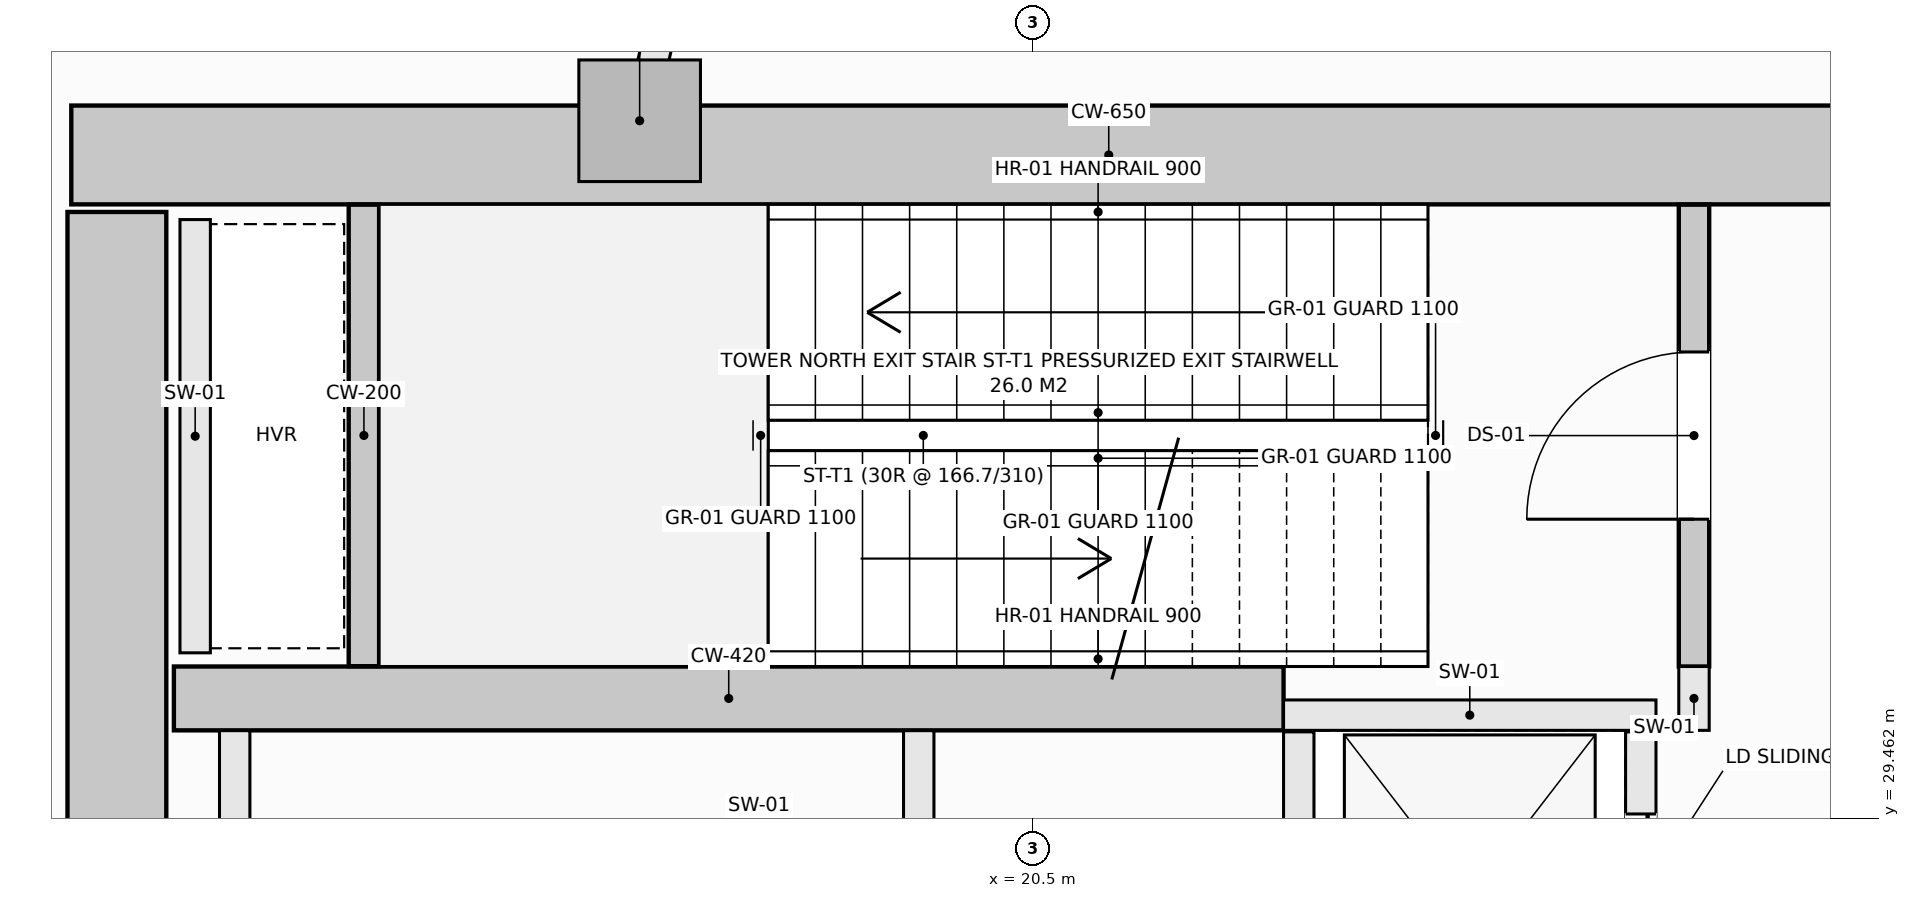
"""IFC4 building model, lengths in metres.
Left out: names, types, materials, properties, quantities, classifications, styles, units other than length and angle.
Written with IfcOpenShell. Run it as: python <this file> out.ifc"""

import sys

from ifc_helpers import new_model, si_unit, direction, frame, frame_2d, origin, origin_2d, place, context, subcontext, project, spatial, rectangle, extrude, element, fill, save


model = new_model("IFC4")
c1 = context("Model", 3, precision=1e-05, world=origin(), true_north=direction((0.0, 1.0)))
c2 = subcontext(c1, "Body", "Model", "MODEL_VIEW")
j1 = project(units=[si_unit("LENGTHUNIT", "METRE"), si_unit("PLANEANGLEUNIT", "RADIAN")], contexts=[c1])
p1 = place(None, origin())
s1 = spatial("IfcSite", under=j1, at=p1, CompositionType="ELEMENT")
p2 = place(p1, origin())
s2 = spatial("IfcBuilding", under=s1, at=p2, CompositionType="ELEMENT")
p3 = place(p2, frame((0.0, 0.0, 186.9)))
s3 = spatial("IfcBuildingStorey", under=s2, at=p3, CompositionType="ELEMENT", Elevation=186.9)
p4 = place(p3, frame((14.175, 33.825, -0.32), z_axis=(0.0, 0.0, 1.0), x_axis=(1.0, 0.0, 0.0)))
e1 = element("IfcWall", 1, at=p4, inside=s3, PredefinedType="SHEAR", context=c2, shape_type="SweptSolid", body=[
    extrude(rectangle(XDim=13.65, YDim=0.65, at=frame_2d((6.825, 0.0))), origin(), (0.0, 0.0, 1.0), 5.04),
])
p5 = place(p3, frame((14.475, 20.55, -0.32), z_axis=(0.0, 0.0, 1.0), x_axis=(0.0, 1.0, 0.0)))
e2 = element("IfcWall", 2, at=p5, inside=s3, PredefinedType="SHEAR", context=c2, shape_type="SweptSolid", body=[
    extrude(rectangle(XDim=12.9, YDim=0.65, at=frame_2d((6.45, 0.0))), origin(), (0.0, 0.0, 1.0), 5.04),
])
p6 = place(p3, frame((14.85, 30.25, -0.32), z_axis=(0.0, 0.0, 1.0), x_axis=(1.0, 0.0, 0.0)))
e3 = element("IfcWall", 3, at=p6, inside=s3, PredefinedType="SHEAR", context=c2, shape_type="SweptSolid", body=[
    extrude(rectangle(XDim=7.3, YDim=0.42, at=frame_2d((3.65, 0.0))), origin(), (0.0, 0.0, 1.0), 5.04),
])
p7 = place(p3, frame((17.914, 34.05, -0.32), z_axis=(0.0, 0.0, 1.0), x_axis=(1.0, 0.0, 0.0)))
e4 = element("IfcColumn", 4, at=p7, inside=s3, PredefinedType="PILASTER", context=c2, shape_type="SweptSolid", body=[
    extrude(rectangle(XDim=0.8, YDim=0.8, at=origin_2d()), origin(), (0.0, 0.0, 1.0), 5.04),
])
p8 = place(p3, frame((24.85, 30.46, -0.32), z_axis=(0.0, 0.0, 1.0), x_axis=(0.0, 1.0, 0.0)))
e5 = element("IfcWall", 5, at=p8, inside=s3, PredefinedType="SHEAR", context=c2, shape_type="SweptSolid", body=[
    extrude(rectangle(XDim=3.038, YDim=0.2, at=frame_2d((1.519, 0.0))), origin(), (0.0, 0.0, 1.0), 5.04),
])
p9 = place(p8, frame((0.969, 0.0, 0.32)))
e6 = element("IfcOpeningElement", 6, at=p9, cuts=e5, PredefinedType="OPENING", context=c2, shape_type="SweptSolid", body=[
    extrude(rectangle(XDim=1.1, YDim=2.15, at=frame_2d((0.55, 1.075))), frame((0.0, 0.11, 0.0), z_axis=(0.0, -1.0, 0.0), x_axis=(1.0, 0.0, 0.0)), (0.0, 0.0, 1.0), 0.22),
])
p10 = place(p3, frame((16.1, 30.462, -0.32), z_axis=(0.0, 0.0, 1.0), x_axis=(0.0, 1.0, 0.0)))
e7 = element("IfcWall", 7, at=p10, inside=s3, PredefinedType="SHEAR", context=c2, shape_type="SweptSolid", body=[
    extrude(rectangle(XDim=3.036, YDim=0.2, at=frame_2d((1.518, 0.0))), origin(), (0.0, 0.0, 1.0), 5.04),
])
p11 = place(p3, frame((22.15, 30.14, 0.0), z_axis=(0.0, 0.0, 1.0), x_axis=(1.0, 0.0, 0.0)))
e8 = element("IfcWall", 8, at=p11, inside=s3, PredefinedType="SOLIDWALL", context=c2, shape_type="SweptSolid", body=[
    extrude(rectangle(XDim=2.45, YDim=0.2, at=frame_2d((1.225, 0.0))), origin(), (0.0, 0.0, 1.0), 4.72),
])
p12 = place(p3, frame((22.25, 27.85, 0.0), z_axis=(0.0, 0.0, 1.0), x_axis=(0.0, 1.0, 0.0)))
e9 = element("IfcWall", 9, at=p12, inside=s3, PredefinedType="SOLIDWALL", context=c2, shape_type="SweptSolid", body=[
    extrude(rectangle(XDim=2.18, YDim=0.2, at=frame_2d((1.09, 0.0))), origin(), (0.0, 0.0, 1.0), 4.72),
])
p13 = place(p3, frame((24.5, 27.85, 0.0), z_axis=(0.0, 0.0, 1.0), x_axis=(0.0, 1.0, 0.0)))
e10 = element("IfcWall", 10, at=p13, inside=s3, PredefinedType="SOLIDWALL", context=c2, shape_type="SweptSolid", body=[
    extrude(rectangle(XDim=2.18, YDim=0.2, at=frame_2d((1.09, 0.0))), origin(), (0.0, 0.0, 1.0), 4.72),
])
p14 = place(p13, frame((0.54, 0.0, 0.0)))
e11 = element("IfcOpeningElement", 11, at=p14, cuts=e10, PredefinedType="OPENING", context=c2, shape_type="SweptSolid", body=[
    extrude(rectangle(XDim=1.1, YDim=2.2, at=frame_2d((0.55, 1.1))), frame((0.0, 0.11, 0.0), z_axis=(0.0, -1.0, 0.0), x_axis=(1.0, 0.0, 0.0)), (0.0, 0.0, 1.0), 0.22),
])
p15 = place(p3, frame((14.99, 30.55, 0.0), z_axis=(0.0, 0.0, 1.0), x_axis=(0.0, 1.0, 0.0)))
e12 = element("IfcWall", 12, at=p15, inside=s3, PredefinedType="SOLIDWALL", context=c2, shape_type="SweptSolid", body=[
    extrude(rectangle(XDim=2.85, YDim=0.2, at=frame_2d((1.425, 0.0))), origin(), (0.0, 0.0, 1.0), 4.72),
])
p16 = place(p3, frame((24.85, 30.04, 0.0), z_axis=(0.0, 0.0, 1.0), x_axis=(0.0, 1.0, 0.0)))
e13 = element("IfcWall", 13, at=p16, inside=s3, PredefinedType="SOLIDWALL", context=c2, shape_type="SweptSolid", body=[
    extrude(rectangle(XDim=0.42, YDim=0.2, at=frame_2d((0.21, 0.0))), origin(), (0.0, 0.0, 1.0), 4.72),
])
for number, where, z_axis, x_axis in (
    (14, (15.25, 27.942, 0.0), (0.0, 0.0, 1.0), (0.0, 1.0, 0.0)),
    (15, (19.75, 27.942, 0.0), (0.0, 0.0, 1.0), (0.0, 1.0, 0.0)),
):
    element("IfcWall", number, at=place(p3, frame(where, z_axis=z_axis, x_axis=x_axis)), inside=s3, PredefinedType="SOLIDWALL", context=c2, shape_type="SweptSolid", body=[
        extrude(rectangle(XDim=2.096, YDim=0.2, at=frame_2d((1.048, 0.0))), origin(), (0.0, 0.0, 1.0), 4.72),
    ])
p17 = place(p3, frame((17.937, 34.152, 0.0), z_axis=(0.0, 0.0, 1.0), x_axis=(0.221974559012, 0.975052457641, 0.0)))
e16 = element("IfcWall", 16, at=p17, inside=s3, PredefinedType="SOLIDWALL", context=c2, shape_type="SweptSolid", body=[
    extrude(rectangle(XDim=1.045, YDim=0.2, at=frame_2d((0.522, 0.0))), origin(), (0.0, 0.0, 1.0), 4.72),
])
p18 = place(p9, origin())
e17 = element("IfcDoor", 17, at=p18, inside=s3, OperationType="SINGLE_SWING_LEFT", PredefinedType="DOOR", context=c2, shape_type="SweptSolid", body=[
    extrude(rectangle(XDim=1.1, YDim=2.15, at=frame_2d((0.55, 1.075))), frame((0.0, 0.025, 0.0), z_axis=(0.0, -1.0, 0.0), x_axis=(1.0, 0.0, 0.0)), (0.0, 0.0, 1.0), 0.05),
])
fill(e6, e17)
p19 = place(p14, origin())
e18 = element("IfcDoor", 18, at=p19, inside=s3, OperationType="SLIDING_TO_LEFT", PredefinedType="DOOR", context=c2, shape_type="SweptSolid", body=[
    extrude(rectangle(XDim=1.1, YDim=2.2, at=frame_2d((0.55, 1.1))), frame((0.0, 0.025, 0.0), z_axis=(0.0, -1.0, 0.0), x_axis=(1.0, 0.0, 0.0)), (0.0, 0.0, 1.0), 0.05),
])
fill(e11, e18)
save(model, sys.argv[1])
